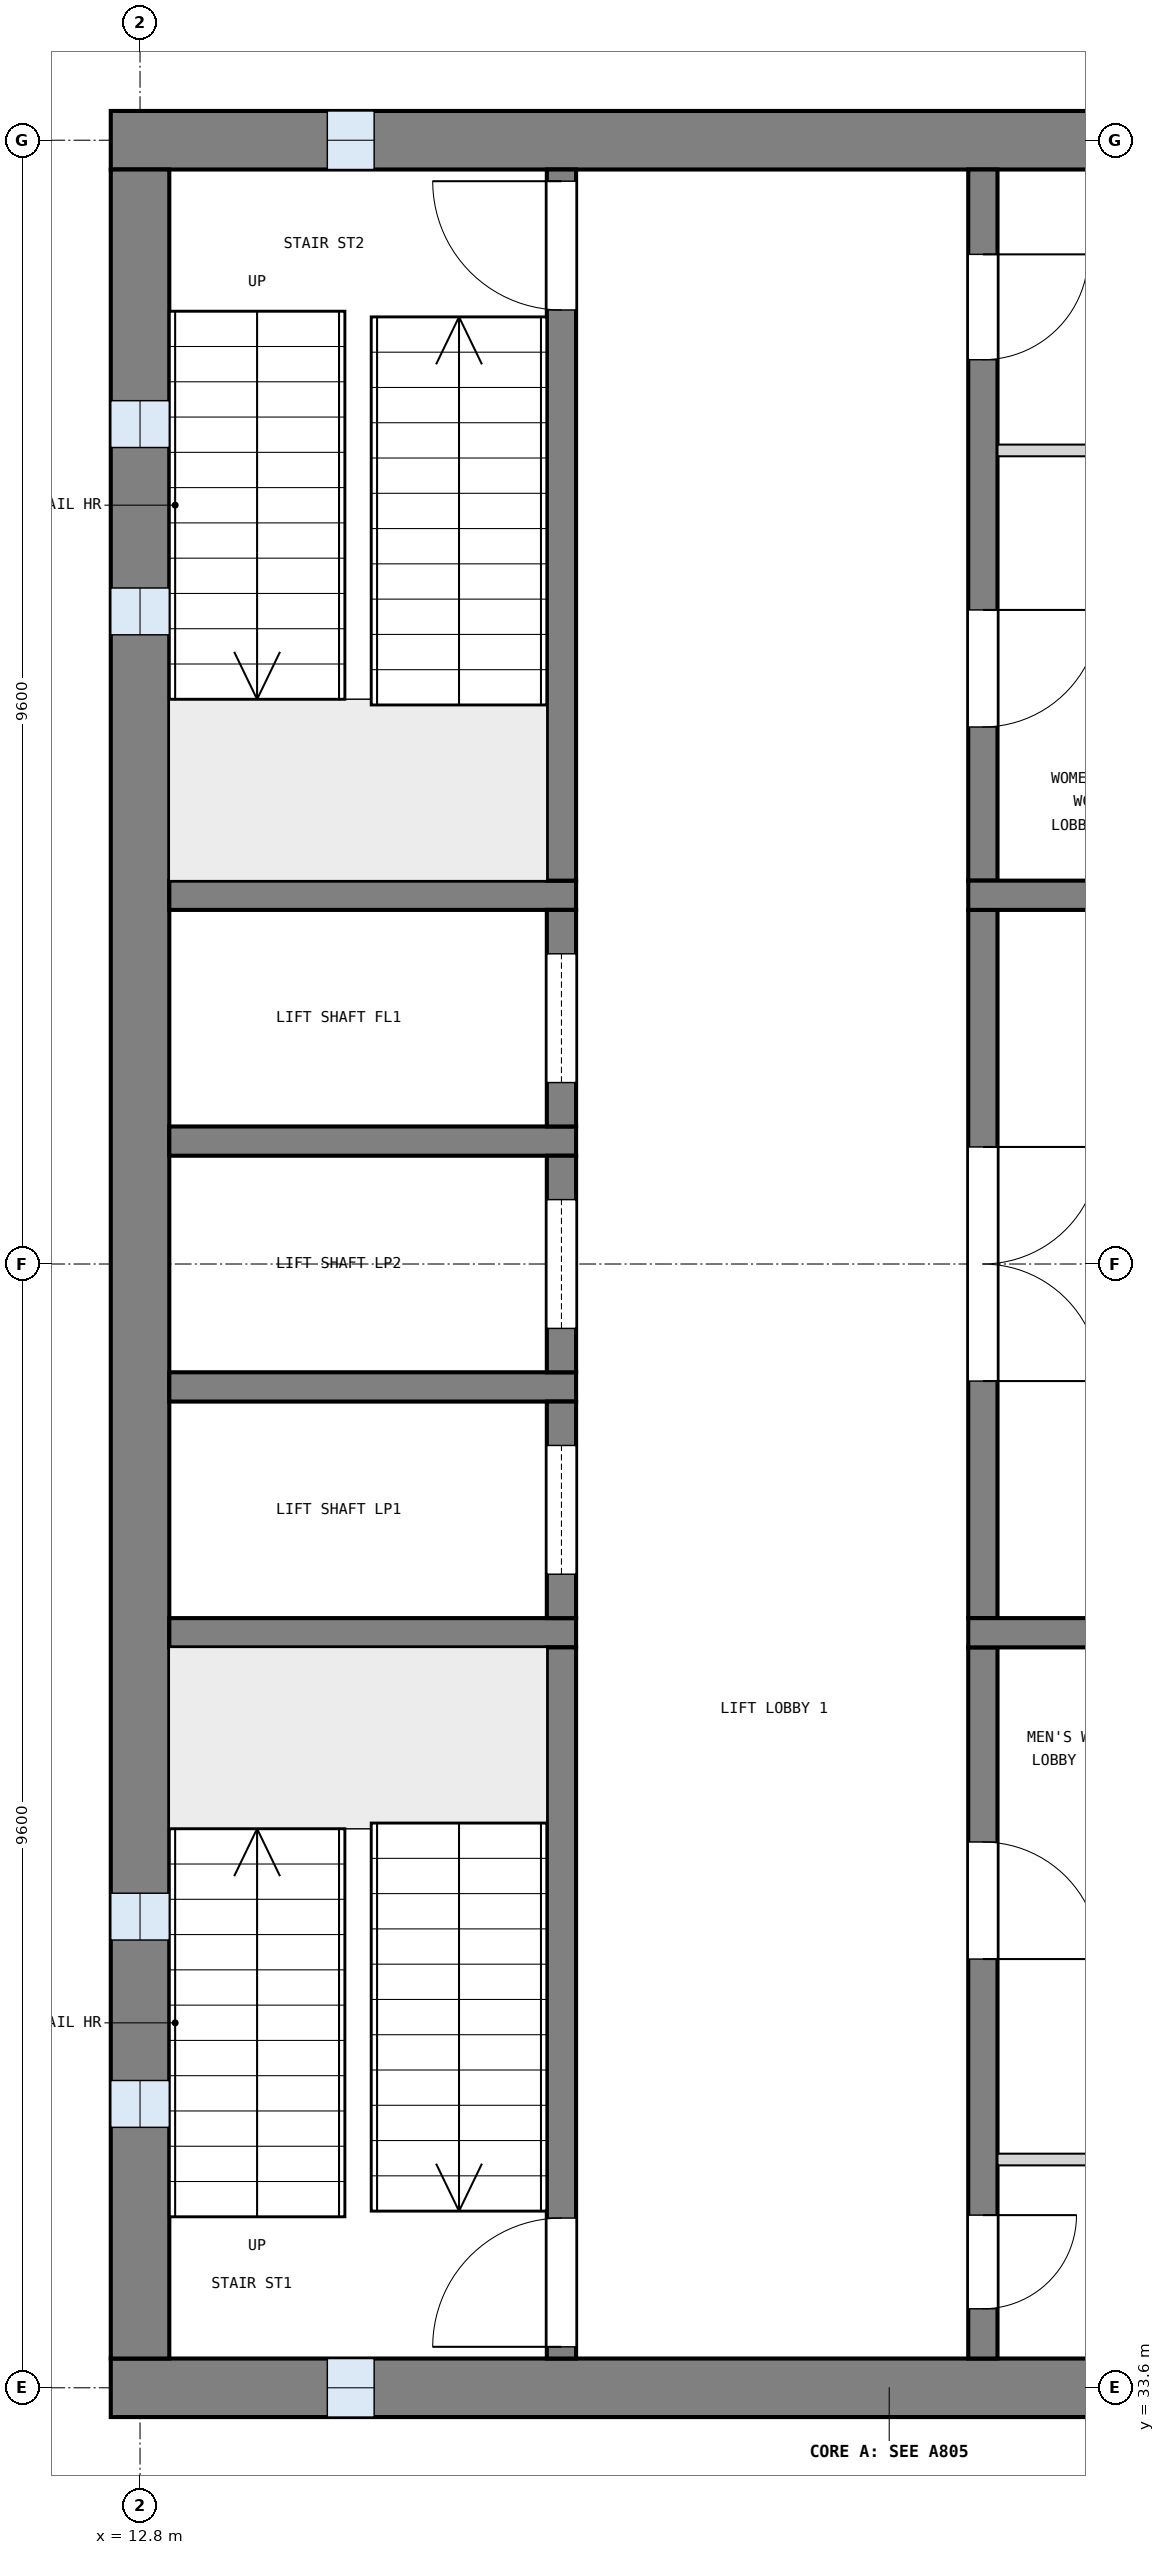
"""IFC4 building model, lengths in metres.
Left out: names, types, materials, properties, quantities, classifications, styles, units other than length and angle.
Written with IfcOpenShell. Run it as: python <this file> out.ifc"""

import sys

from ifc_helpers import new_model, si_unit, direction, frame, frame_2d, origin, place, context, subcontext, project, spatial, rectangle, extrude, element, fill, save


model = new_model("IFC4")
c1 = context("Model", 3, precision=1e-05, world=origin(), true_north=direction((0.0, 1.0)))
c2 = subcontext(c1, "Body", "Model", "MODEL_VIEW")
j1 = project(units=[si_unit("LENGTHUNIT", "METRE"), si_unit("PLANEANGLEUNIT", "RADIAN")], contexts=[c1])
p1 = place(None, origin())
s1 = spatial("IfcSite", under=j1, at=p1, CompositionType="ELEMENT")
p2 = place(p1, origin())
s2 = spatial("IfcBuilding", under=s1, at=p2, CompositionType="ELEMENT")
p3 = place(p2, frame((0.0, 0.0, 12.9)))
s3 = spatial("IfcBuildingStorey", under=s2, at=p3, CompositionType="ELEMENT", Elevation=12.9)
p4 = place(p3, frame((12.55, 52.8, 0.0), z_axis=(0.0, 0.0, 1.0), x_axis=(1.0, 0.0, 0.0)))
e1 = element("IfcWall", 1, at=p4, inside=s3, PredefinedType="SHEAR", context=c2, shape_type="SweptSolid", body=[
    extrude(rectangle(XDim=13.3, YDim=0.5, at=frame_2d((6.65, 0.0))), origin(), (0.0, 0.0, 1.0), 4.2),
])
p5 = place(p4, frame((1.85, 0.0, 1.0)))
e2 = element("IfcOpeningElement", 2, at=p5, cuts=e1, PredefinedType="OPENING", context=c2, shape_type="SweptSolid", body=[
    extrude(rectangle(XDim=0.4, YDim=2.0, at=frame_2d((0.2, 1.0))), frame((0.0, 0.26, 0.0), z_axis=(0.0, -1.0, 0.0), x_axis=(1.0, 0.0, 0.0)), (0.0, 0.0, 1.0), 0.52),
])
p6 = place(p3, frame((12.55, 33.6, 0.0), z_axis=(0.0, 0.0, 1.0), x_axis=(1.0, 0.0, 0.0)))
e3 = element("IfcWall", 3, at=p6, inside=s3, PredefinedType="SHEAR", context=c2, shape_type="SweptSolid", body=[
    extrude(rectangle(XDim=13.3, YDim=0.5, at=frame_2d((6.65, 0.0))), origin(), (0.0, 0.0, 1.0), 4.2),
])
p7 = place(p6, frame((1.85, 0.0, 1.0)))
e4 = element("IfcOpeningElement", 4, at=p7, cuts=e3, PredefinedType="OPENING", context=c2, shape_type="SweptSolid", body=[
    extrude(rectangle(XDim=0.4, YDim=2.0, at=frame_2d((0.2, 1.0))), frame((0.0, 0.26, 0.0), z_axis=(0.0, -1.0, 0.0), x_axis=(1.0, 0.0, 0.0)), (0.0, 0.0, 1.0), 0.52),
])
p8 = place(p3, frame((12.8, 33.85, 0.0), z_axis=(0.0, 0.0, 1.0), x_axis=(0.0, 1.0, 0.0)))
e5 = element("IfcWall", 5, at=p8, inside=s3, PredefinedType="SHEAR", context=c2, shape_type="SweptSolid", body=[
    extrude(rectangle(XDim=18.7, YDim=0.5, at=frame_2d((9.35, 0.0))), origin(), (0.0, 0.0, 1.0), 4.2),
])
p9 = place(p8, frame((1.975, 0.0, 1.0)))
e6 = element("IfcOpeningElement", 6, at=p9, cuts=e5, PredefinedType="OPENING", context=c2, shape_type="SweptSolid", body=[
    extrude(rectangle(XDim=0.4, YDim=2.0, at=frame_2d((0.2, 1.0))), frame((0.0, 0.26, 0.0), z_axis=(0.0, -1.0, 0.0), x_axis=(1.0, 0.0, 0.0)), (0.0, 0.0, 1.0), 0.52),
])
p10 = place(p8, frame((3.575, 0.0, 1.0)))
e7 = element("IfcOpeningElement", 7, at=p10, cuts=e5, PredefinedType="OPENING", context=c2, shape_type="SweptSolid", body=[
    extrude(rectangle(XDim=0.4, YDim=2.0, at=frame_2d((0.2, 1.0))), frame((0.0, 0.26, 0.0), z_axis=(0.0, -1.0, 0.0), x_axis=(1.0, 0.0, 0.0)), (0.0, 0.0, 1.0), 0.52),
])
p11 = place(p8, frame((14.725, 0.0, 1.0)))
e8 = element("IfcOpeningElement", 8, at=p11, cuts=e5, PredefinedType="OPENING", context=c2, shape_type="SweptSolid", body=[
    extrude(rectangle(XDim=0.4, YDim=2.0, at=frame_2d((0.2, 1.0))), frame((0.0, 0.26, 0.0), z_axis=(0.0, -1.0, 0.0), x_axis=(1.0, 0.0, 0.0)), (0.0, 0.0, 1.0), 0.52),
])
p12 = place(p8, frame((16.325, 0.0, 1.0)))
e9 = element("IfcOpeningElement", 9, at=p12, cuts=e5, PredefinedType="OPENING", context=c2, shape_type="SweptSolid", body=[
    extrude(rectangle(XDim=0.4, YDim=2.0, at=frame_2d((0.2, 1.0))), frame((0.0, 0.26, 0.0), z_axis=(0.0, -1.0, 0.0), x_axis=(1.0, 0.0, 0.0)), (0.0, 0.0, 1.0), 0.52),
])
for number, where, z_axis, x_axis in (
    (10, (13.05, 40.05, 0.0), (0.0, 0.0, 1.0), (1.0, 0.0, 0.0)),
    (11, (13.05, 42.15, 0.0), (0.0, 0.0, 1.0), (1.0, 0.0, 0.0)),
    (12, (13.05, 44.25, 0.0), (0.0, 0.0, 1.0), (1.0, 0.0, 0.0)),
    (13, (13.05, 46.35, 0.0), (0.0, 0.0, 1.0), (1.0, 0.0, 0.0)),
):
    element("IfcWall", number, at=place(p3, frame(where, z_axis=z_axis, x_axis=x_axis)), inside=s3, PredefinedType="SOLIDWALL", context=c2, shape_type="SweptSolid", body=[
        extrude(rectangle(XDim=3.475, YDim=0.25, at=frame_2d((1.737, 0.0))), origin(), (0.0, 0.0, 1.0), 3.9),
    ])
p13 = place(p3, frame((16.4, 33.85, 0.0), z_axis=(0.0, 0.0, 1.0), x_axis=(0.0, 1.0, 0.0)))
e14 = element("IfcWall", 14, at=p13, inside=s3, PredefinedType="SOLIDWALL", context=c2, shape_type="SweptSolid", body=[
    extrude(rectangle(XDim=6.075, YDim=0.25, at=frame_2d((3.038, 0.0))), origin(), (0.0, 0.0, 1.0), 3.9),
])
p14 = place(p13, frame((0.1, 0.0, 0.0)))
e15 = element("IfcOpeningElement", 15, at=p14, cuts=e14, PredefinedType="OPENING", context=c2, shape_type="SweptSolid", body=[
    extrude(rectangle(XDim=1.1, YDim=2.1, at=frame_2d((0.55, 1.05))), frame((0.0, 0.135, 0.0), z_axis=(0.0, -1.0, 0.0), x_axis=(1.0, 0.0, 0.0)), (0.0, 0.0, 1.0), 0.27),
])
p15 = place(p3, frame((16.4, 40.175, 0.0), z_axis=(0.0, 0.0, 1.0), x_axis=(0.0, 1.0, 0.0)))
e16 = element("IfcWall", 16, at=p15, inside=s3, PredefinedType="SOLIDWALL", context=c2, shape_type="SweptSolid", body=[
    extrude(rectangle(XDim=1.85, YDim=0.25, at=frame_2d((0.925, 0.0))), origin(), (0.0, 0.0, 1.0), 3.9),
])
p16 = place(p15, frame((0.375, 0.0, 0.0)))
e17 = element("IfcOpeningElement", 17, at=p16, cuts=e16, PredefinedType="OPENING", context=c2, shape_type="SweptSolid", body=[
    extrude(rectangle(XDim=1.1, YDim=2.1, at=frame_2d((0.55, 1.05))), frame((0.0, 0.135, 0.0), z_axis=(0.0, -1.0, 0.0), x_axis=(1.0, 0.0, 0.0)), (0.0, 0.0, 1.0), 0.27),
])
p17 = place(p3, frame((16.4, 42.275, 0.0), z_axis=(0.0, 0.0, 1.0), x_axis=(0.0, 1.0, 0.0)))
e18 = element("IfcWall", 18, at=p17, inside=s3, PredefinedType="SOLIDWALL", context=c2, shape_type="SweptSolid", body=[
    extrude(rectangle(XDim=1.85, YDim=0.25, at=frame_2d((0.925, 0.0))), origin(), (0.0, 0.0, 1.0), 3.9),
])
p18 = place(p17, frame((0.375, 0.0, 0.0)))
e19 = element("IfcOpeningElement", 19, at=p18, cuts=e18, PredefinedType="OPENING", context=c2, shape_type="SweptSolid", body=[
    extrude(rectangle(XDim=1.1, YDim=2.1, at=frame_2d((0.55, 1.05))), frame((0.0, 0.135, 0.0), z_axis=(0.0, -1.0, 0.0), x_axis=(1.0, 0.0, 0.0)), (0.0, 0.0, 1.0), 0.27),
])
p19 = place(p3, frame((16.4, 44.375, 0.0), z_axis=(0.0, 0.0, 1.0), x_axis=(0.0, 1.0, 0.0)))
e20 = element("IfcWall", 20, at=p19, inside=s3, PredefinedType="SOLIDWALL", context=c2, shape_type="SweptSolid", body=[
    extrude(rectangle(XDim=1.85, YDim=0.25, at=frame_2d((0.925, 0.0))), origin(), (0.0, 0.0, 1.0), 3.9),
])
p20 = place(p19, frame((0.375, 0.0, 0.0)))
e21 = element("IfcOpeningElement", 21, at=p20, cuts=e20, PredefinedType="OPENING", context=c2, shape_type="SweptSolid", body=[
    extrude(rectangle(XDim=1.1, YDim=2.1, at=frame_2d((0.55, 1.05))), frame((0.0, 0.135, 0.0), z_axis=(0.0, -1.0, 0.0), x_axis=(1.0, 0.0, 0.0)), (0.0, 0.0, 1.0), 0.27),
])
p21 = place(p3, frame((16.4, 46.475, 0.0), z_axis=(0.0, 0.0, 1.0), x_axis=(0.0, 1.0, 0.0)))
e22 = element("IfcWall", 22, at=p21, inside=s3, PredefinedType="SOLIDWALL", context=c2, shape_type="SweptSolid", body=[
    extrude(rectangle(XDim=6.075, YDim=0.25, at=frame_2d((3.038, 0.0))), origin(), (0.0, 0.0, 1.0), 3.9),
])
p22 = place(p21, frame((4.875, 0.0, 0.0)))
e23 = element("IfcOpeningElement", 23, at=p22, cuts=e22, PredefinedType="OPENING", context=c2, shape_type="SweptSolid", body=[
    extrude(rectangle(XDim=1.1, YDim=2.1, at=frame_2d((0.55, 1.05))), frame((0.0, 0.135, 0.0), z_axis=(0.0, -1.0, 0.0), x_axis=(1.0, 0.0, 0.0)), (0.0, 0.0, 1.0), 0.27),
])
p23 = place(p3, frame((20.0, 33.85, 0.0), z_axis=(0.0, 0.0, 1.0), x_axis=(0.0, 1.0, 0.0)))
e24 = element("IfcWall", 24, at=p23, inside=s3, PredefinedType="SOLIDWALL", context=c2, shape_type="SweptSolid", body=[
    extrude(rectangle(XDim=6.075, YDim=0.25, at=frame_2d((3.038, 0.0))), origin(), (0.0, 0.0, 1.0), 3.9),
])
p24 = place(p23, frame((0.425, 0.0, 0.0)))
e25 = element("IfcOpeningElement", 25, at=p24, cuts=e24, PredefinedType="OPENING", context=c2, shape_type="SweptSolid", body=[
    extrude(rectangle(XDim=0.8, YDim=2.1, at=frame_2d((0.4, 1.05))), frame((0.0, 0.135, 0.0), z_axis=(0.0, -1.0, 0.0), x_axis=(1.0, 0.0, 0.0)), (0.0, 0.0, 1.0), 0.27),
])
p25 = place(p23, frame((3.413, 0.0, 0.0)))
e26 = element("IfcOpeningElement", 26, at=p25, cuts=e24, PredefinedType="OPENING", context=c2, shape_type="SweptSolid", body=[
    extrude(rectangle(XDim=1.0, YDim=2.1, at=frame_2d((0.5, 1.05))), frame((0.0, 0.135, 0.0), z_axis=(0.0, -1.0, 0.0), x_axis=(1.0, 0.0, 0.0)), (0.0, 0.0, 1.0), 0.27),
])
p26 = place(p3, frame((20.0, 40.175, 0.0), z_axis=(0.0, 0.0, 1.0), x_axis=(0.0, 1.0, 0.0)))
e27 = element("IfcWall", 27, at=p26, inside=s3, PredefinedType="SOLIDWALL", context=c2, shape_type="SweptSolid", body=[
    extrude(rectangle(XDim=6.05, YDim=0.25, at=frame_2d((3.025, 0.0))), origin(), (0.0, 0.0, 1.0), 3.9),
])
p27 = place(p26, frame((2.025, 0.0, 0.0)))
e28 = element("IfcOpeningElement", 28, at=p27, cuts=e27, PredefinedType="OPENING", context=c2, shape_type="SweptSolid", body=[
    extrude(rectangle(XDim=2.0, YDim=2.1, at=frame_2d((1.0, 1.05))), frame((0.0, 0.135, 0.0), z_axis=(0.0, -1.0, 0.0), x_axis=(1.0, 0.0, 0.0)), (0.0, 0.0, 1.0), 0.27),
])
p28 = place(p3, frame((20.0, 46.475, 0.0), z_axis=(0.0, 0.0, 1.0), x_axis=(0.0, 1.0, 0.0)))
e29 = element("IfcWall", 29, at=p28, inside=s3, PredefinedType="SOLIDWALL", context=c2, shape_type="SweptSolid", body=[
    extrude(rectangle(XDim=6.075, YDim=0.25, at=frame_2d((3.038, 0.0))), origin(), (0.0, 0.0, 1.0), 3.9),
])
p29 = place(p28, frame((1.312, 0.0, 0.0)))
e30 = element("IfcOpeningElement", 30, at=p29, cuts=e29, PredefinedType="OPENING", context=c2, shape_type="SweptSolid", body=[
    extrude(rectangle(XDim=1.0, YDim=2.1, at=frame_2d((0.5, 1.05))), frame((0.0, 0.135, 0.0), z_axis=(0.0, -1.0, 0.0), x_axis=(1.0, 0.0, 0.0)), (0.0, 0.0, 1.0), 0.27),
])
p30 = place(p28, frame((4.45, 0.0, 0.0)))
e31 = element("IfcOpeningElement", 31, at=p30, cuts=e29, PredefinedType="OPENING", context=c2, shape_type="SweptSolid", body=[
    extrude(rectangle(XDim=0.9, YDim=2.1, at=frame_2d((0.45, 1.05))), frame((0.0, 0.135, 0.0), z_axis=(0.0, -1.0, 0.0), x_axis=(1.0, 0.0, 0.0)), (0.0, 0.0, 1.0), 0.27),
])
for number, where, z_axis, x_axis in (
    (32, (19.875, 40.05, 0.0), (0.0, 0.0, 1.0), (1.0, 0.0, 0.0)),
    (33, (19.875, 46.35, 0.0), (0.0, 0.0, 1.0), (1.0, 0.0, 0.0)),
):
    element("IfcWall", number, at=place(p3, frame(where, z_axis=z_axis, x_axis=x_axis)), inside=s3, PredefinedType="SOLIDWALL", context=c2, shape_type="SweptSolid", body=[
        extrude(rectangle(XDim=5.475, YDim=0.25, at=frame_2d((2.738, 0.0))), origin(), (0.0, 0.0, 1.0), 3.9),
    ])
for number, where, z_axis, x_axis in (
    (34, (20.125, 35.55, 0.0), (0.0, 0.0, 1.0), (1.0, 0.0, 0.0)),
    (35, (20.125, 50.15, 0.0), (0.0, 0.0, 1.0), (1.0, 0.0, 0.0)),
):
    element("IfcWall", number, at=place(p3, frame(where, z_axis=z_axis, x_axis=x_axis)), inside=s3, PredefinedType="PARTITIONING", context=c2, shape_type="SweptSolid", body=[
        extrude(rectangle(XDim=5.225, YDim=0.1, at=frame_2d((2.613, 0.0))), origin(), (0.0, 0.0, 1.0), 3.9),
    ])
p31 = place(p9, origin())
e36 = element("IfcWindow", 36, at=p31, inside=s3, PartitioningType="SINGLE_PANEL", PredefinedType="WINDOW", context=c2, shape_type="SweptSolid", body=[
    extrude(rectangle(XDim=0.4, YDim=2.0, at=frame_2d((0.2, 1.0))), frame((0.0, 0.03, 0.0), z_axis=(0.0, -1.0, 0.0), x_axis=(1.0, 0.0, 0.0)), (0.0, 0.0, 1.0), 0.06),
])
fill(e6, e36)
p32 = place(p10, origin())
e37 = element("IfcWindow", 37, at=p32, inside=s3, PartitioningType="SINGLE_PANEL", PredefinedType="WINDOW", context=c2, shape_type="SweptSolid", body=[
    extrude(rectangle(XDim=0.4, YDim=2.0, at=frame_2d((0.2, 1.0))), frame((0.0, 0.03, 0.0), z_axis=(0.0, -1.0, 0.0), x_axis=(1.0, 0.0, 0.0)), (0.0, 0.0, 1.0), 0.06),
])
fill(e7, e37)
p33 = place(p11, origin())
e38 = element("IfcWindow", 38, at=p33, inside=s3, PartitioningType="SINGLE_PANEL", PredefinedType="WINDOW", context=c2, shape_type="SweptSolid", body=[
    extrude(rectangle(XDim=0.4, YDim=2.0, at=frame_2d((0.2, 1.0))), frame((0.0, 0.03, 0.0), z_axis=(0.0, -1.0, 0.0), x_axis=(1.0, 0.0, 0.0)), (0.0, 0.0, 1.0), 0.06),
])
fill(e8, e38)
p34 = place(p12, origin())
e39 = element("IfcWindow", 39, at=p34, inside=s3, PartitioningType="SINGLE_PANEL", PredefinedType="WINDOW", context=c2, shape_type="SweptSolid", body=[
    extrude(rectangle(XDim=0.4, YDim=2.0, at=frame_2d((0.2, 1.0))), frame((0.0, 0.03, 0.0), z_axis=(0.0, -1.0, 0.0), x_axis=(1.0, 0.0, 0.0)), (0.0, 0.0, 1.0), 0.06),
])
fill(e9, e39)
p35 = place(p7, origin())
e40 = element("IfcWindow", 40, at=p35, inside=s3, PartitioningType="SINGLE_PANEL", PredefinedType="WINDOW", context=c2, shape_type="SweptSolid", body=[
    extrude(rectangle(XDim=0.4, YDim=2.0, at=frame_2d((0.2, 1.0))), frame((0.0, 0.03, 0.0), z_axis=(0.0, -1.0, 0.0), x_axis=(1.0, 0.0, 0.0)), (0.0, 0.0, 1.0), 0.06),
])
fill(e4, e40)
p36 = place(p5, origin())
e41 = element("IfcWindow", 41, at=p36, inside=s3, PartitioningType="SINGLE_PANEL", PredefinedType="WINDOW", context=c2, shape_type="SweptSolid", body=[
    extrude(rectangle(XDim=0.4, YDim=2.0, at=frame_2d((0.2, 1.0))), frame((0.0, 0.03, 0.0), z_axis=(0.0, -1.0, 0.0), x_axis=(1.0, 0.0, 0.0)), (0.0, 0.0, 1.0), 0.06),
])
fill(e2, e41)
p37 = place(p14, origin())
e42 = element("IfcDoor", 42, at=p37, inside=s3, OperationType="SINGLE_SWING_LEFT", PredefinedType="DOOR", context=c2, shape_type="SweptSolid", body=[
    extrude(rectangle(XDim=1.1, YDim=2.1, at=frame_2d((0.55, 1.05))), frame((0.0, 0.025, 0.0), z_axis=(0.0, -1.0, 0.0), x_axis=(1.0, 0.0, 0.0)), (0.0, 0.0, 1.0), 0.05),
])
fill(e15, e42)
p38 = place(p22, origin())
e43 = element("IfcDoor", 43, at=p38, inside=s3, OperationType="SINGLE_SWING_RIGHT", PredefinedType="DOOR", context=c2, shape_type="SweptSolid", body=[
    extrude(rectangle(XDim=1.1, YDim=2.1, at=frame_2d((0.55, 1.05))), frame((0.0, 0.025, 0.0), z_axis=(0.0, -1.0, 0.0), x_axis=(1.0, 0.0, 0.0)), (0.0, 0.0, 1.0), 0.05),
])
fill(e23, e43)
p39 = place(p16, origin())
e44 = element("IfcDoor", 44, at=p39, inside=s3, OperationType="SLIDING_TO_LEFT", PredefinedType="DOOR", context=c2, shape_type="SweptSolid", body=[
    extrude(rectangle(XDim=1.1, YDim=2.1, at=frame_2d((0.55, 1.05))), frame((0.0, 0.025, 0.0), z_axis=(0.0, -1.0, 0.0), x_axis=(1.0, 0.0, 0.0)), (0.0, 0.0, 1.0), 0.05),
])
fill(e17, e44)
p40 = place(p18, origin())
e45 = element("IfcDoor", 45, at=p40, inside=s3, OperationType="SLIDING_TO_LEFT", PredefinedType="DOOR", context=c2, shape_type="SweptSolid", body=[
    extrude(rectangle(XDim=1.1, YDim=2.1, at=frame_2d((0.55, 1.05))), frame((0.0, 0.025, 0.0), z_axis=(0.0, -1.0, 0.0), x_axis=(1.0, 0.0, 0.0)), (0.0, 0.0, 1.0), 0.05),
])
fill(e19, e45)
p41 = place(p20, origin())
e46 = element("IfcDoor", 46, at=p41, inside=s3, OperationType="SLIDING_TO_LEFT", PredefinedType="DOOR", context=c2, shape_type="SweptSolid", body=[
    extrude(rectangle(XDim=1.1, YDim=2.1, at=frame_2d((0.55, 1.05))), frame((0.0, 0.025, 0.0), z_axis=(0.0, -1.0, 0.0), x_axis=(1.0, 0.0, 0.0)), (0.0, 0.0, 1.0), 0.05),
])
fill(e21, e46)
p42 = place(p27, frame((2.0, 0.0, 0.0), z_axis=(0.0, 0.0, 1.0), x_axis=(-1.0, 0.0, 0.0)))
e47 = element("IfcDoor", 47, at=p42, inside=s3, OperationType="DOUBLE_DOOR_SINGLE_SWING", PredefinedType="DOOR", context=c2, shape_type="SweptSolid", body=[
    extrude(rectangle(XDim=2.0, YDim=2.1, at=frame_2d((1.0, 1.05))), frame((0.0, 0.025, 0.0), z_axis=(0.0, -1.0, 0.0), x_axis=(1.0, 0.0, 0.0)), (0.0, 0.0, 1.0), 0.05),
])
fill(e28, e47)
p43 = place(p24, frame((0.8, 0.0, 0.0), z_axis=(0.0, 0.0, 1.0), x_axis=(-1.0, 0.0, 0.0)))
e48 = element("IfcDoor", 48, at=p43, inside=s3, OperationType="SINGLE_SWING_LEFT", PredefinedType="DOOR", context=c2, shape_type="SweptSolid", body=[
    extrude(rectangle(XDim=0.8, YDim=2.1, at=frame_2d((0.4, 1.05))), frame((0.0, 0.025, 0.0), z_axis=(0.0, -1.0, 0.0), x_axis=(1.0, 0.0, 0.0)), (0.0, 0.0, 1.0), 0.05),
])
fill(e25, e48)
p44 = place(p25, frame((1.0, 0.0, 0.0), z_axis=(0.0, 0.0, 1.0), x_axis=(-1.0, 0.0, 0.0)))
e49 = element("IfcDoor", 49, at=p44, inside=s3, OperationType="SINGLE_SWING_RIGHT", PredefinedType="DOOR", context=c2, shape_type="SweptSolid", body=[
    extrude(rectangle(XDim=1.0, YDim=2.1, at=frame_2d((0.5, 1.05))), frame((0.0, 0.025, 0.0), z_axis=(0.0, -1.0, 0.0), x_axis=(1.0, 0.0, 0.0)), (0.0, 0.0, 1.0), 0.05),
])
fill(e26, e49)
p45 = place(p29, frame((1.0, 0.0, 0.0), z_axis=(0.0, 0.0, 1.0), x_axis=(-1.0, 0.0, 0.0)))
e50 = element("IfcDoor", 50, at=p45, inside=s3, OperationType="SINGLE_SWING_LEFT", PredefinedType="DOOR", context=c2, shape_type="SweptSolid", body=[
    extrude(rectangle(XDim=1.0, YDim=2.1, at=frame_2d((0.5, 1.05))), frame((0.0, 0.025, 0.0), z_axis=(0.0, -1.0, 0.0), x_axis=(1.0, 0.0, 0.0)), (0.0, 0.0, 1.0), 0.05),
])
fill(e30, e50)
p46 = place(p30, frame((0.9, 0.0, 0.0), z_axis=(0.0, 0.0, 1.0), x_axis=(-1.0, 0.0, 0.0)))
e51 = element("IfcDoor", 51, at=p46, inside=s3, OperationType="SINGLE_SWING_LEFT", PredefinedType="DOOR", context=c2, shape_type="SweptSolid", body=[
    extrude(rectangle(XDim=0.9, YDim=2.1, at=frame_2d((0.45, 1.05))), frame((0.0, 0.025, 0.0), z_axis=(0.0, -1.0, 0.0), x_axis=(1.0, 0.0, 0.0)), (0.0, 0.0, 1.0), 0.05),
])
fill(e31, e51)
save(model, sys.argv[1])
